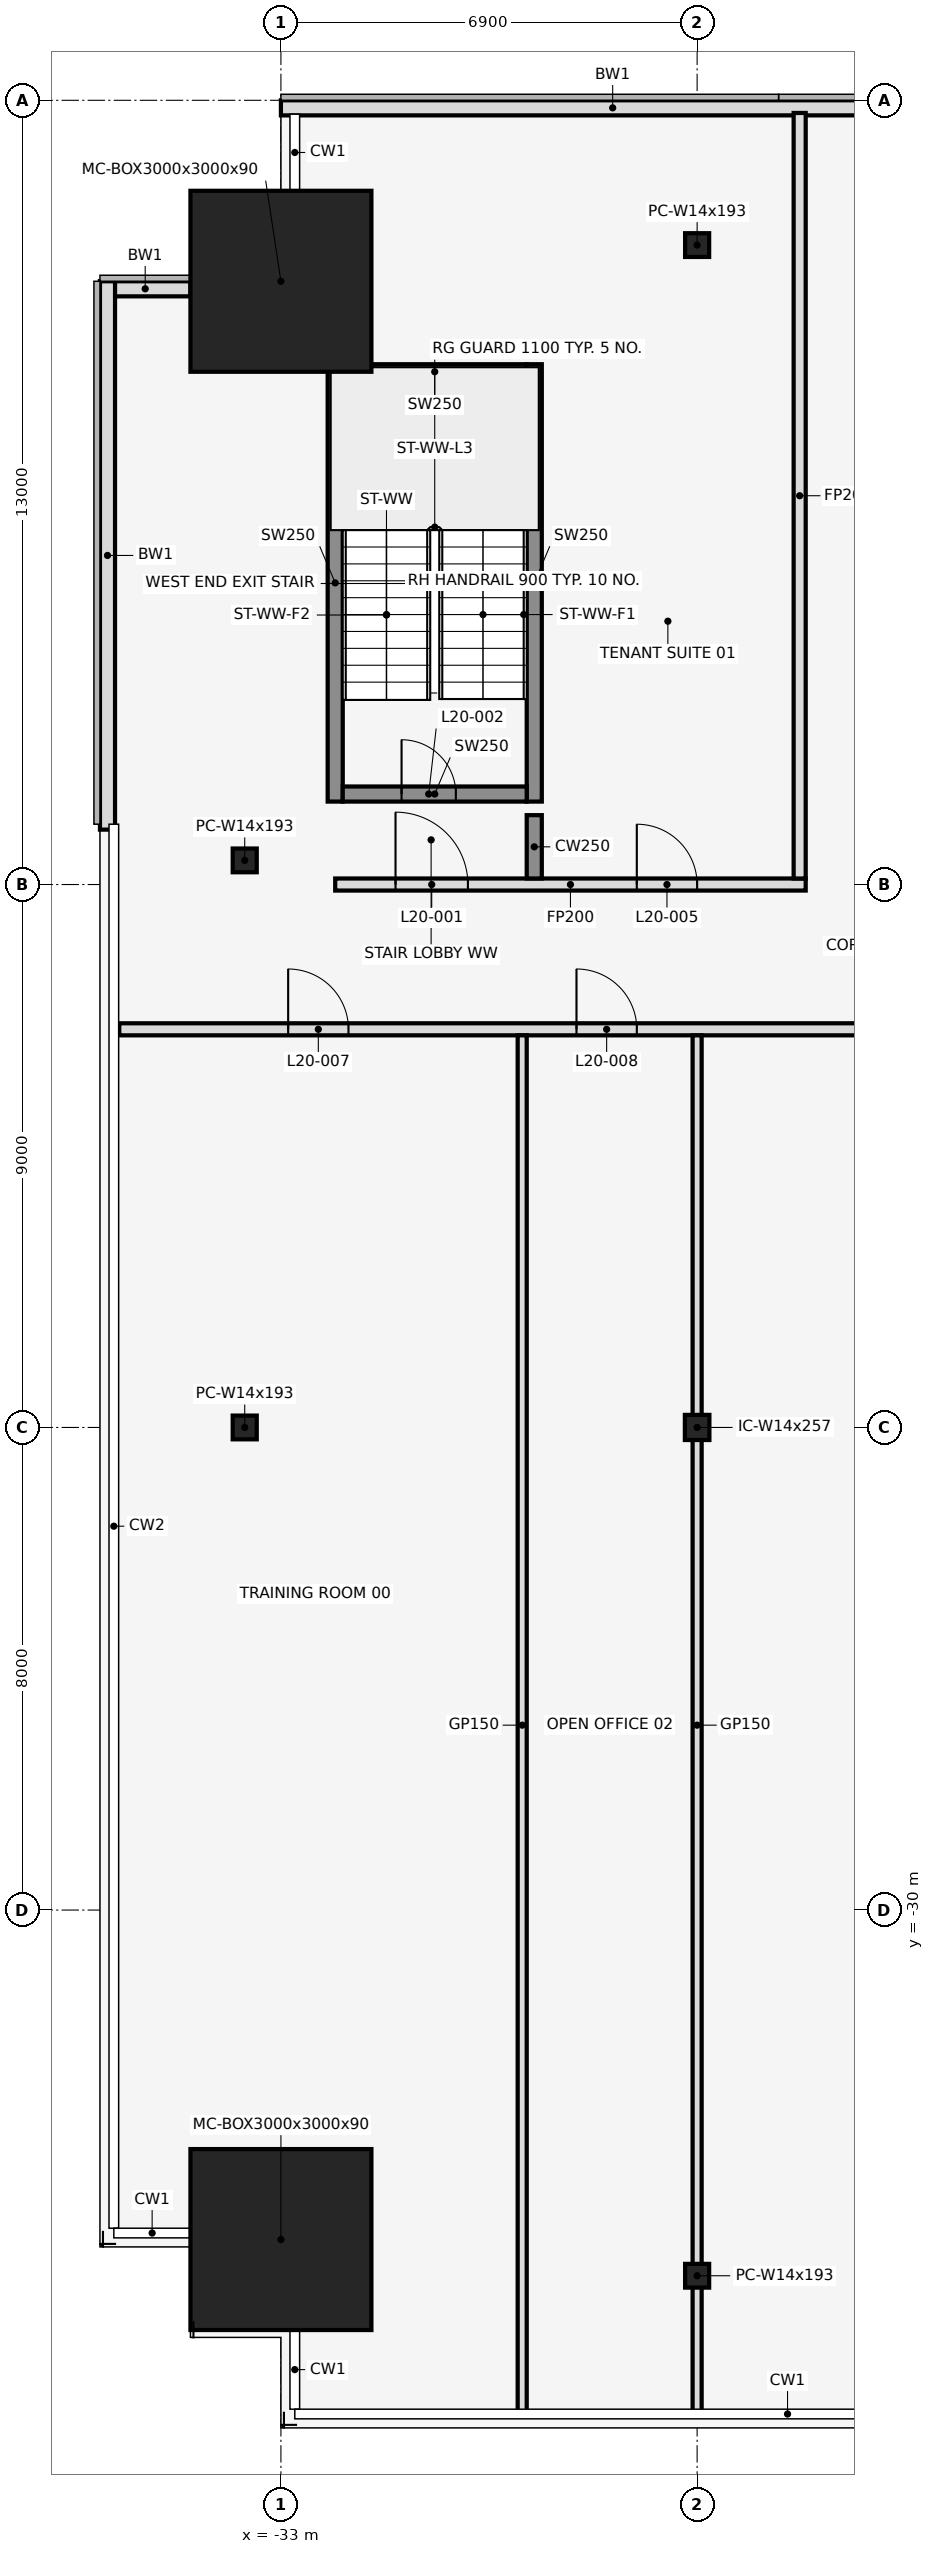
"""IFC4 building model, lengths in metres.
Left out: names, types, materials, properties, quantities, classifications, styles, units other than length and angle.
Written with IfcOpenShell. Run it as: python <this file> out.ifc"""

import sys

from ifc_helpers import new_model, si_unit, direction, frame, frame_2d, origin, origin_2d, place, context, subcontext, project, spatial, rectangle, hollow_rectangle, i_section, extrude, element, fill, save


model = new_model("IFC4")
c1 = context("Model", 3, precision=1e-05, world=origin(), true_north=direction((0.0, 1.0)))
c2 = subcontext(c1, "Body", "Model", "MODEL_VIEW")
j1 = project(units=[si_unit("LENGTHUNIT", "METRE"), si_unit("PLANEANGLEUNIT", "RADIAN")], contexts=[c1])
p1 = place(None, origin())
s1 = spatial("IfcSite", under=j1, at=p1, CompositionType="ELEMENT")
p2 = place(p1, origin())
s2 = spatial("IfcBuilding", under=s1, at=p2, CompositionType="ELEMENT")
p3 = place(p2, frame((0.0, 0.0, 98.1)))
s3 = spatial("IfcBuildingStorey", under=s2, at=p3, CompositionType="ELEMENT", Elevation=98.1)
for number, where, z_axis, x_axis in (
    (1, (-33.0, -35.462, 0.0), (0.0, 0.0, 1.0), (1.0, 0.0, 0.0)),
    (2, (-33.0, -3.0, 0.0), (0.0, 0.0, 1.0), (1.0, 0.0, 0.0)),
):
    element("IfcColumn", number, at=place(p3, frame(where, z_axis=z_axis, x_axis=x_axis)), inside=s3, PredefinedType="COLUMN", context=c2, shape_type="SweptSolid", body=[
        extrude(hollow_rectangle(XDim=3.0, YDim=3.0, WallThickness=0.09, at=origin_2d()), origin(), (0.0, 0.0, 1.0), 4.1),
    ])
for number, where, z_axis, x_axis in (
    (3, (-26.1, -36.062, 0.0), (0.0, 0.0, 1.0), (1.0, 0.0, 0.0)),
    (4, (-26.1, -2.4, 0.0), (0.0, 0.0, 1.0), (1.0, 0.0, 0.0)),
    (5, (-33.6, -12.6, 0.0), (0.0, 0.0, 1.0), (1.0, 0.0, 0.0)),
    (6, (-33.6, -22.0, 0.0), (0.0, 0.0, 1.0), (1.0, 0.0, 0.0)),
):
    element("IfcColumn", number, at=place(p3, frame(where, z_axis=z_axis, x_axis=x_axis)), inside=s3, PredefinedType="COLUMN", context=c2, shape_type="SweptSolid", body=[
        extrude(i_section(OverallWidth=0.399, OverallDepth=0.394, WebThickness=0.023, FlangeThickness=0.037, at=origin_2d()), origin(), (0.0, 0.0, 1.0), 4.1),
    ])
p4 = place(p3, frame((-26.1, -22.0, 0.0), z_axis=(0.0, 0.0, 1.0), x_axis=(1.0, 0.0, 0.0)))
e7 = element("IfcColumn", 7, at=p4, inside=s3, PredefinedType="COLUMN", context=c2, shape_type="SweptSolid", body=[
    extrude(i_section(OverallWidth=0.406, OverallDepth=0.417, WebThickness=0.03, FlangeThickness=0.048, at=origin_2d()), origin(), (0.0, 0.0, 1.0), 4.1),
])
p5 = place(p3, frame((-22.0, -0.125, 0.0), z_axis=(0.0, 0.0, 1.0), x_axis=(-1.0, 0.0, 0.0)))
e8 = element("IfcWall", 8, at=p5, inside=s3, PredefinedType="STANDARD", context=c2, shape_type="SweptSolid", body=[
    extrude(rectangle(XDim=11.0, YDim=0.25, at=frame_2d((5.5, 0.0))), origin(), (0.0, 0.0, 1.0), 3.95),
])
p6 = place(p3, frame((-34.5, -3.125, 0.0), z_axis=(0.0, 0.0, 1.0), x_axis=(-1.0, 0.0, 0.0)))
e9 = element("IfcWall", 9, at=p6, inside=s3, PredefinedType="STANDARD", context=c2, shape_type="SweptSolid", body=[
    extrude(rectangle(XDim=1.5, YDim=0.25, at=frame_2d((0.75, 0.0))), origin(), (0.0, 0.0, 1.0), 3.95),
])
p7 = place(p3, frame((-35.875, -3.0, 0.0), z_axis=(0.0, 0.0, 1.0), x_axis=(0.0, -1.0, 0.0)))
e10 = element("IfcWall", 10, at=p7, inside=s3, PredefinedType="STANDARD", context=c2, shape_type="SweptSolid", body=[
    extrude(rectangle(XDim=9.09, YDim=0.25, at=frame_2d((4.545, 0.0))), origin(), (0.0, 0.0, 1.0), 3.95),
])
for number, where, z_axis, x_axis in (
    (11, (-32.1, -11.625, 0.0), (0.0, 0.0, 1.0), (0.0, 1.0, 0.0)),
    (12, (-28.8, -11.625, 0.0), (0.0, 0.0, 1.0), (0.0, 1.0, 0.0)),
):
    element("IfcWall", number, at=place(p3, frame(where, z_axis=z_axis, x_axis=x_axis)), inside=s3, PredefinedType="SHEAR", context=c2, shape_type="SweptSolid", body=[
        extrude(rectangle(XDim=7.25, YDim=0.25, at=frame_2d((3.625, 0.0))), origin(), (0.0, 0.0, 1.0), 4.1),
    ])
p8 = place(p3, frame((-31.975, -11.5, 0.0), z_axis=(0.0, 0.0, 1.0), x_axis=(1.0, 0.0, 0.0)))
e13 = element("IfcWall", 13, at=p8, inside=s3, PredefinedType="SHEAR", context=c2, shape_type="SweptSolid", body=[
    extrude(rectangle(XDim=3.05, YDim=0.25, at=frame_2d((1.525, 0.0))), origin(), (0.0, 0.0, 1.0), 4.1),
])
p9 = place(p8, frame((0.975, 0.0, 0.0)))
e14 = element("IfcOpeningElement", 14, at=p9, cuts=e13, PredefinedType="OPENING", context=c2, shape_type="SweptSolid", body=[
    extrude(rectangle(XDim=0.9, YDim=2.1, at=frame_2d((0.45, 1.05))), frame((0.0, 0.137, 0.0), z_axis=(0.0, -1.0, 0.0), x_axis=(1.0, 0.0, 0.0)), (0.0, 0.0, 1.0), 0.274),
])
p10 = place(p3, frame((-31.975, -4.5, 0.0), z_axis=(0.0, 0.0, 1.0), x_axis=(1.0, 0.0, 0.0)))
e15 = element("IfcWall", 15, at=p10, inside=s3, PredefinedType="SHEAR", context=c2, shape_type="SweptSolid", body=[
    extrude(rectangle(XDim=3.05, YDim=0.25, at=frame_2d((1.525, 0.0))), origin(), (0.0, 0.0, 1.0), 4.1),
])
p11 = place(p3, frame((-35.68, -15.4, 0.0), z_axis=(0.0, 0.0, 1.0), x_axis=(1.0, 0.0, 0.0)))
e16 = element("IfcWall", 16, at=p11, inside=s3, PredefinedType="PARTITIONING", context=c2, shape_type="SweptSolid", body=[
    extrude(rectangle(XDim=71.36, YDim=0.2, at=frame_2d((35.68, 0.0))), origin(), (0.0, 0.0, 1.0), 3.018),
])
p12 = place(p11, frame((2.8, 0.0, 0.0)))
e17 = element("IfcOpeningElement", 17, at=p12, cuts=e16, PredefinedType="OPENING", context=c2, shape_type="SweptSolid", body=[
    extrude(rectangle(XDim=1.0, YDim=2.1, at=frame_2d((0.5, 1.05))), frame((0.0, 0.112, 0.0), z_axis=(0.0, -1.0, 0.0), x_axis=(1.0, 0.0, 0.0)), (0.0, 0.0, 1.0), 0.224),
])
p13 = place(p11, frame((7.58, 0.0, 0.0)))
e18 = element("IfcOpeningElement", 18, at=p13, cuts=e16, PredefinedType="OPENING", context=c2, shape_type="SweptSolid", body=[
    extrude(rectangle(XDim=1.0, YDim=2.1, at=frame_2d((0.5, 1.05))), frame((0.0, 0.112, 0.0), z_axis=(0.0, -1.0, 0.0), x_axis=(1.0, 0.0, 0.0)), (0.0, 0.0, 1.0), 0.224),
])
p14 = place(p11, frame((13.48, 0.0, 0.0)))
e19 = element("IfcOpeningElement", 19, at=p14, cuts=e16, PredefinedType="OPENING", context=c2, shape_type="SweptSolid", body=[
    extrude(rectangle(XDim=1.0, YDim=2.1, at=frame_2d((0.5, 1.05))), frame((0.0, 0.112, 0.0), z_axis=(0.0, -1.0, 0.0), x_axis=(1.0, 0.0, 0.0)), (0.0, 0.0, 1.0), 0.224),
])
p15 = place(p11, frame((20.68, 0.0, 0.0)))
e20 = element("IfcOpeningElement", 20, at=p15, cuts=e16, PredefinedType="OPENING", context=c2, shape_type="SweptSolid", body=[
    extrude(rectangle(XDim=1.0, YDim=2.1, at=frame_2d((0.5, 1.05))), frame((0.0, 0.112, 0.0), z_axis=(0.0, -1.0, 0.0), x_axis=(1.0, 0.0, 0.0)), (0.0, 0.0, 1.0), 0.224),
])
p16 = place(p11, frame((29.38, 0.0, 0.0)))
e21 = element("IfcOpeningElement", 21, at=p16, cuts=e16, PredefinedType="OPENING", context=c2, shape_type="SweptSolid", body=[
    extrude(rectangle(XDim=1.0, YDim=2.1, at=frame_2d((0.5, 1.05))), frame((0.0, 0.112, 0.0), z_axis=(0.0, -1.0, 0.0), x_axis=(1.0, 0.0, 0.0)), (0.0, 0.0, 1.0), 0.224),
])
p17 = place(p11, frame((38.08, 0.0, 0.0)))
e22 = element("IfcOpeningElement", 22, at=p17, cuts=e16, PredefinedType="OPENING", context=c2, shape_type="SweptSolid", body=[
    extrude(rectangle(XDim=1.0, YDim=2.1, at=frame_2d((0.5, 1.05))), frame((0.0, 0.112, 0.0), z_axis=(0.0, -1.0, 0.0), x_axis=(1.0, 0.0, 0.0)), (0.0, 0.0, 1.0), 0.224),
])
p18 = place(p11, frame((45.38, 0.0, 0.0)))
e23 = element("IfcOpeningElement", 23, at=p18, cuts=e16, PredefinedType="OPENING", context=c2, shape_type="SweptSolid", body=[
    extrude(rectangle(XDim=0.9, YDim=2.1, at=frame_2d((0.45, 1.05))), frame((0.0, 0.112, 0.0), z_axis=(0.0, -1.0, 0.0), x_axis=(1.0, 0.0, 0.0)), (0.0, 0.0, 1.0), 0.224),
])
p19 = place(p11, frame((54.08, 0.0, 0.0)))
e24 = element("IfcOpeningElement", 24, at=p19, cuts=e16, PredefinedType="OPENING", context=c2, shape_type="SweptSolid", body=[
    extrude(rectangle(XDim=1.0, YDim=2.1, at=frame_2d((0.5, 1.05))), frame((0.0, 0.112, 0.0), z_axis=(0.0, -1.0, 0.0), x_axis=(1.0, 0.0, 0.0)), (0.0, 0.0, 1.0), 0.224),
])
p20 = place(p11, frame((64.58, 0.0, 0.0)))
e25 = element("IfcOpeningElement", 25, at=p20, cuts=e16, PredefinedType="OPENING", context=c2, shape_type="SweptSolid", body=[
    extrude(rectangle(XDim=1.0, YDim=2.1, at=frame_2d((0.5, 1.05))), frame((0.0, 0.112, 0.0), z_axis=(0.0, -1.0, 0.0), x_axis=(1.0, 0.0, 0.0)), (0.0, 0.0, 1.0), 0.224),
])
p21 = place(p3, frame((-32.1, -13.0, 0.0), z_axis=(0.0, 0.0, 1.0), x_axis=(1.0, 0.0, 0.0)))
e26 = element("IfcWall", 26, at=p21, inside=s3, PredefinedType="PARTITIONING", context=c2, shape_type="SweptSolid", body=[
    extrude(rectangle(XDim=7.8, YDim=0.2, at=frame_2d((3.9, 0.0))), origin(), (0.0, 0.0, 1.0), 3.018),
])
p22 = place(p21, frame((1.0, 0.0, 0.0)))
e27 = element("IfcOpeningElement", 27, at=p22, cuts=e26, PredefinedType="OPENING", context=c2, shape_type="SweptSolid", body=[
    extrude(rectangle(XDim=1.2, YDim=2.1, at=frame_2d((0.6, 1.05))), frame((0.0, 0.112, 0.0), z_axis=(0.0, -1.0, 0.0), x_axis=(1.0, 0.0, 0.0)), (0.0, 0.0, 1.0), 0.224),
])
p23 = place(p21, frame((5.0, 0.0, 0.0)))
e28 = element("IfcOpeningElement", 28, at=p23, cuts=e26, PredefinedType="OPENING", context=c2, shape_type="SweptSolid", body=[
    extrude(rectangle(XDim=1.0, YDim=2.1, at=frame_2d((0.5, 1.05))), frame((0.0, 0.112, 0.0), z_axis=(0.0, -1.0, 0.0), x_axis=(1.0, 0.0, 0.0)), (0.0, 0.0, 1.0), 0.224),
])
p24 = place(p3, frame((-29.0, -38.37, 0.0), z_axis=(0.0, 0.0, 1.0), x_axis=(0.0, 1.0, 0.0)))
e29 = element("IfcWall", 29, at=p24, inside=s3, PredefinedType="PARTITIONING", context=c2, shape_type="SweptSolid", body=[
    extrude(rectangle(XDim=22.87, YDim=0.15, at=frame_2d((11.435, 0.0))), origin(), (0.0, 0.0, 1.0), 3.018),
])
p25 = place(p3, frame((-28.8, -12.9, 0.0), z_axis=(0.0, 0.0, 1.0), x_axis=(0.0, 1.0, 0.0)))
e30 = element("IfcWall", 30, at=p25, inside=s3, PredefinedType="SHEAR", context=c2, shape_type="SweptSolid", body=[
    extrude(rectangle(XDim=1.05, YDim=0.25, at=frame_2d((0.525, 0.0))), origin(), (0.0, 0.0, 1.0), 4.1),
])
p26 = place(p3, frame((-26.1, -38.37, 0.0), z_axis=(0.0, 0.0, 1.0), x_axis=(0.0, 1.0, 0.0)))
e31 = element("IfcWall", 31, at=p26, inside=s3, PredefinedType="PARTITIONING", context=c2, shape_type="SweptSolid", body=[
    extrude(rectangle(XDim=22.87, YDim=0.15, at=frame_2d((11.435, 0.0))), origin(), (0.0, 0.0, 1.0), 3.018),
])
p27 = place(p3, frame((-24.4, -12.9, 0.0), z_axis=(0.0, 0.0, 1.0), x_axis=(0.0, 1.0, 0.0)))
e32 = element("IfcWall", 32, at=p27, inside=s3, PredefinedType="PARTITIONING", context=c2, shape_type="SweptSolid", body=[
    extrude(rectangle(XDim=12.69, YDim=0.2, at=frame_2d((6.345, 0.0))), origin(), (0.0, 0.0, 1.0), 3.018),
])
p28 = place(p22, origin())
e33 = element("IfcDoor", 33, at=p28, inside=s3, OperationType="SINGLE_SWING_LEFT", PredefinedType="DOOR", context=c2, shape_type="SweptSolid", body=[
    extrude(rectangle(XDim=1.2, YDim=2.1, at=frame_2d((0.6, 1.05))), frame((0.0, 0.025, 0.0), z_axis=(0.0, -1.0, 0.0), x_axis=(1.0, 0.0, 0.0)), (0.0, 0.0, 1.0), 0.05),
])
fill(e27, e33)
p29 = place(p9, origin())
e34 = element("IfcDoor", 34, at=p29, inside=s3, OperationType="SINGLE_SWING_LEFT", PredefinedType="DOOR", context=c2, shape_type="SweptSolid", body=[
    extrude(rectangle(XDim=0.9, YDim=2.1, at=frame_2d((0.45, 1.05))), frame((0.0, 0.025, 0.0), z_axis=(0.0, -1.0, 0.0), x_axis=(1.0, 0.0, 0.0)), (0.0, 0.0, 1.0), 0.05),
])
fill(e14, e34)
p30 = place(p23, origin())
e35 = element("IfcDoor", 35, at=p30, inside=s3, OperationType="SINGLE_SWING_LEFT", PredefinedType="DOOR", context=c2, shape_type="SweptSolid", body=[
    extrude(rectangle(XDim=1.0, YDim=2.1, at=frame_2d((0.5, 1.05))), frame((0.0, 0.025, 0.0), z_axis=(0.0, -1.0, 0.0), x_axis=(1.0, 0.0, 0.0)), (0.0, 0.0, 1.0), 0.05),
])
fill(e28, e35)
p31 = place(p12, frame((1.0, 0.0, 0.0), z_axis=(0.0, 0.0, 1.0), x_axis=(-1.0, 0.0, 0.0)))
e36 = element("IfcDoor", 36, at=p31, inside=s3, OperationType="SINGLE_SWING_LEFT", PredefinedType="DOOR", context=c2, shape_type="SweptSolid", body=[
    extrude(rectangle(XDim=1.0, YDim=2.1, at=frame_2d((0.5, 1.05))), frame((0.0, 0.025, 0.0), z_axis=(0.0, -1.0, 0.0), x_axis=(1.0, 0.0, 0.0)), (0.0, 0.0, 1.0), 0.05),
])
fill(e17, e36)
p32 = place(p13, frame((1.0, 0.0, 0.0), z_axis=(0.0, 0.0, 1.0), x_axis=(-1.0, 0.0, 0.0)))
e37 = element("IfcDoor", 37, at=p32, inside=s3, OperationType="SINGLE_SWING_RIGHT", PredefinedType="DOOR", context=c2, shape_type="SweptSolid", body=[
    extrude(rectangle(XDim=1.0, YDim=2.1, at=frame_2d((0.5, 1.05))), frame((0.0, 0.025, 0.0), z_axis=(0.0, -1.0, 0.0), x_axis=(1.0, 0.0, 0.0)), (0.0, 0.0, 1.0), 0.05),
])
fill(e18, e37)
save(model, sys.argv[1])
